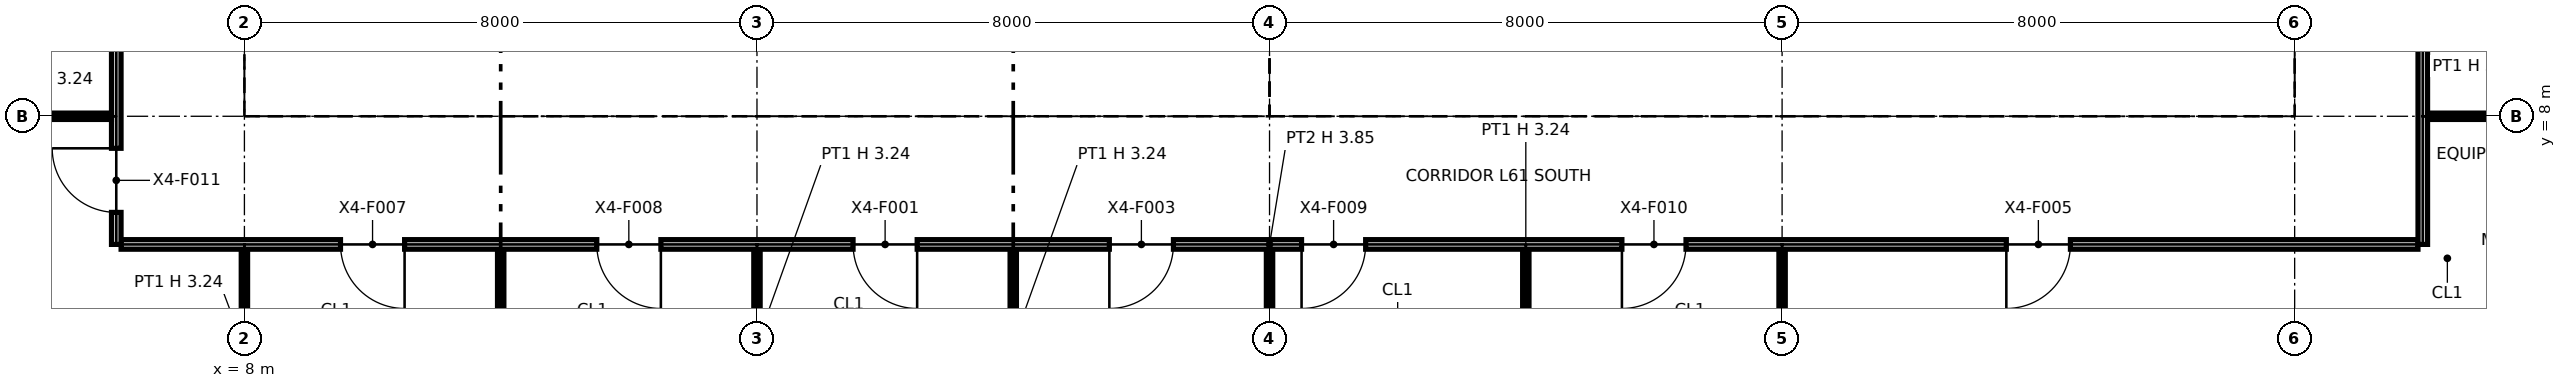
"""IFC4 building model, lengths in metres.
Left out: names, types, materials, properties, quantities, classifications, styles, units other than length and angle.
Written with IfcOpenShell. Run it as: python <this file> out.ifc"""

import sys

from ifc_helpers import new_model, si_unit, direction, frame, frame_2d, origin, origin_2d, place, context, subcontext, project, spatial, polyline, rectangle, i_section, outline, extrude, element, fill, save


model = new_model("IFC4")
c1 = context("Model", 3, precision=1e-05, world=origin(), true_north=direction((0.0, 1.0)))
c2 = subcontext(c1, "Body", "Model", "MODEL_VIEW")
j1 = project(units=[si_unit("LENGTHUNIT", "METRE"), si_unit("PLANEANGLEUNIT", "RADIAN")], contexts=[c1])
p1 = place(None, origin())
s1 = spatial("IfcSite", under=j1, at=p1, CompositionType="ELEMENT")
p2 = place(p1, origin())
s2 = spatial("IfcBuilding", under=s1, at=p2, CompositionType="ELEMENT")
p3 = place(p2, frame((0.0, 0.0, 279.0)))
s3 = spatial("IfcBuildingStorey", under=s2, at=p3, CompositionType="ELEMENT", Elevation=279.0)
for number, where, z_axis, x_axis in (
    (1, (8.0, 8.0, 0.0), (0.0, 0.0, 1.0), (1.0, 0.0, 0.0)),
    (2, (16.0, 8.0, 0.0), (0.0, 0.0, 1.0), (1.0, 0.0, 0.0)),
):
    element("IfcColumn", number, at=place(p3, frame(where, z_axis=z_axis, x_axis=x_axis)), inside=s3, PredefinedType="COLUMN", context=c2, shape_type="SweptSolid", body=[
        extrude(i_section(OverallWidth=0.257, OverallDepth=0.363, WebThickness=0.013, FlangeThickness=0.022, at=origin_2d()), origin(), (0.0, 0.0, 1.0), 3.85),
    ])
p4 = place(p3, frame((24.0, 8.0, 0.0), z_axis=(0.0, 0.0, 1.0), x_axis=(1.0, 0.0, 0.0)))
e3 = element("IfcColumn", 3, at=p4, inside=s3, PredefinedType="COLUMN", context=c2, shape_type="SweptSolid", body=[
    extrude(i_section(OverallWidth=0.371, OverallDepth=0.361, WebThickness=0.012, FlangeThickness=0.02, at=origin_2d()), origin(), (0.0, 0.0, 1.0), 3.85),
])
for number, where, z_axis, x_axis in (
    (4, (32.0, 8.0, 0.0), (0.0, 0.0, 1.0), (1.0, 0.0, 0.0)),
    (5, (40.0, 8.0, 0.0), (0.0, 0.0, 1.0), (1.0, 0.0, 0.0)),
):
    element("IfcColumn", number, at=place(p3, frame(where, z_axis=z_axis, x_axis=x_axis)), inside=s3, PredefinedType="COLUMN", context=c2, shape_type="SweptSolid", body=[
        extrude(i_section(OverallWidth=0.257, OverallDepth=0.363, WebThickness=0.013, FlangeThickness=0.022, at=origin_2d()), origin(), (0.0, 0.0, 1.0), 3.85),
    ])
p5 = place(p3, frame((8.65, 8.75, 0.0), z_axis=(0.0, 0.0, 1.0), x_axis=(1.0, 0.0, 0.0)))
e6 = element("IfcWall", 6, at=p5, inside=s3, PredefinedType="PARTITIONING", context=c2, shape_type="SweptSolid", body=[
    extrude(outline(polyline([(0.0, 0.0), (14.7, 0.0), (14.7, 3.85), (7.438, 3.85), (7.437, 3.318), (7.263, 3.318), (7.262, 3.85), (0.0, 3.85), (0.0, 0.0)])), frame((0.0, 0.1, 0.0), z_axis=(0.0, -1.0, 0.0), x_axis=(1.0, 0.0, 0.0)), (0.0, 0.0, 1.0), 0.2),
])
p6 = place(p5, frame((1.3, 0.0, 0.0)))
e7 = element("IfcOpeningElement", 7, at=p6, cuts=e6, PredefinedType="OPENING", context=c2, shape_type="SweptSolid", body=[
    extrude(rectangle(XDim=1.4, YDim=2.1, at=frame_2d((0.7, 1.05))), frame((0.0, 0.11, 0.0), z_axis=(0.0, -1.0, 0.0), x_axis=(1.0, 0.0, 0.0)), (0.0, 0.0, 1.0), 0.22),
])
p7 = place(p5, frame((4.6, 0.0, 0.0)))
e8 = element("IfcOpeningElement", 8, at=p7, cuts=e6, PredefinedType="OPENING", context=c2, shape_type="SweptSolid", body=[
    extrude(rectangle(XDim=1.4, YDim=2.1, at=frame_2d((0.7, 1.05))), frame((0.0, 0.11, 0.0), z_axis=(0.0, -1.0, 0.0), x_axis=(1.0, 0.0, 0.0)), (0.0, 0.0, 1.0), 0.22),
])
p8 = place(p5, frame((10.4, 0.0, 0.0)))
e9 = element("IfcOpeningElement", 9, at=p8, cuts=e6, PredefinedType="OPENING", context=c2, shape_type="SweptSolid", body=[
    extrude(rectangle(XDim=1.2, YDim=2.1, at=frame_2d((0.6, 1.05))), frame((0.0, 0.11, 0.0), z_axis=(0.0, -1.0, 0.0), x_axis=(1.0, 0.0, 0.0)), (0.0, 0.0, 1.0), 0.22),
])
p9 = place(p3, frame((8.75, 8.85, 0.0), z_axis=(0.0, 0.0, 1.0), x_axis=(0.0, 1.0, 0.0)))
e10 = element("IfcWall", 10, at=p9, inside=s3, PredefinedType="PARTITIONING", context=c2, shape_type="SweptSolid", body=[
    extrude(outline(polyline([(0.0, 0.0), (14.3, 0.0), (14.3, 3.85), (10.225, 3.85), (10.224, 3.44), (10.076, 3.44), (10.075, 3.85), (7.238, 3.85), (7.237, 3.318), (7.063, 3.318), (7.062, 3.85), (0.0, 3.85), (0.0, 0.0)])), frame((0.0, 0.1, 0.0), z_axis=(0.0, -1.0, 0.0), x_axis=(1.0, 0.0, 0.0)), (0.0, 0.0, 1.0), 0.2),
])
p10 = place(p9, frame((8.3, 0.0, 0.0)))
e11 = element("IfcOpeningElement", 11, at=p10, cuts=e10, PredefinedType="OPENING", context=c2, shape_type="SweptSolid", body=[
    extrude(rectangle(XDim=1.8, YDim=2.1, at=frame_2d((0.9, 1.05))), frame((0.0, 0.11, 0.0), z_axis=(0.0, -1.0, 0.0), x_axis=(1.0, 0.0, 0.0)), (0.0, 0.0, 1.0), 0.22),
])
p11 = place(p3, frame((12.4, 8.85, 0.0), z_axis=(0.0, 0.0, 1.0), x_axis=(0.0, 1.0, 0.0)))
e12 = element("IfcWall", 12, at=p11, inside=s3, PredefinedType="PARTITIONING", context=c2, shape_type="SweptSolid", body=[
    extrude(rectangle(XDim=6.85, YDim=0.2, at=frame_2d((3.425, 0.0))), origin(), (0.0, 0.0, 1.0), 3.85),
])
p12 = place(p3, frame((15.85, 8.85, 0.0), z_axis=(0.0, 0.0, 1.0), x_axis=(0.0, 1.0, 0.0)))
e13 = element("IfcWall", 13, at=p12, inside=s3, PredefinedType="PARTITIONING", context=c2, shape_type="SweptSolid", body=[
    extrude(rectangle(XDim=1.55, YDim=0.9, at=frame_2d((0.775, 0.0))), origin(), (0.0, 0.0, 1.0), 3.318),
])
p13 = place(p12, frame((0.3, 0.0, 0.0)))
e14 = element("IfcOpeningElement", 14, at=p13, cuts=e13, PredefinedType="OPENING", context=c2, shape_type="SweptSolid", body=[
    extrude(rectangle(XDim=1.1, YDim=2.1, at=frame_2d((0.55, 1.05))), frame((0.0, 0.46, 0.0), z_axis=(0.0, -1.0, 0.0), x_axis=(1.0, 0.0, 0.0)), (0.0, 0.0, 1.0), 0.92),
])
p14 = place(p3, frame((23.25, 8.85, 0.0), z_axis=(0.0, 0.0, 1.0), x_axis=(0.0, 1.0, 0.0)))
e15 = element("IfcWall", 15, at=p14, inside=s3, PredefinedType="PARTITIONING", context=c2, shape_type="SweptSolid", body=[
    extrude(outline(polyline([(0.0, 0.0), (14.3, 0.0), (14.3, 3.85), (10.225, 3.85), (10.224, 3.44), (10.076, 3.44), (10.075, 3.85), (7.238, 3.85), (7.237, 3.318), (7.063, 3.318), (7.062, 3.85), (5.225, 3.85), (5.224, 3.44), (5.076, 3.44), (5.075, 3.85), (0.0, 3.85), (0.0, 0.0)])), frame((0.0, 0.1, 0.0), z_axis=(0.0, -1.0, 0.0), x_axis=(1.0, 0.0, 0.0)), (0.0, 0.0, 1.0), 0.2),
])
p15 = place(p14, frame((8.3, 0.0, 0.0)))
e16 = element("IfcOpeningElement", 16, at=p15, cuts=e15, PredefinedType="OPENING", context=c2, shape_type="SweptSolid", body=[
    extrude(rectangle(XDim=1.8, YDim=2.1, at=frame_2d((0.9, 1.05))), frame((0.0, 0.11, 0.0), z_axis=(0.0, -1.0, 0.0), x_axis=(1.0, 0.0, 0.0)), (0.0, 0.0, 1.0), 0.22),
])
p16 = place(p3, frame((24.65, 8.75, 0.0), z_axis=(0.0, 0.0, 1.0), x_axis=(1.0, 0.0, 0.0)))
e17 = element("IfcWall", 17, at=p16, inside=s3, PredefinedType="PARTITIONING", context=c2, shape_type="SweptSolid", body=[
    extrude(outline(polyline([(0.0, 0.0), (14.7, 0.0), (14.7, 3.85), (7.438, 3.85), (7.437, 3.318), (7.263, 3.318), (7.262, 3.85), (0.0, 3.85), (0.0, 0.0)])), frame((0.0, 0.1, 0.0), z_axis=(0.0, -1.0, 0.0), x_axis=(1.0, 0.0, 0.0)), (0.0, 0.0, 1.0), 0.2),
])
p17 = place(p3, frame((24.75, 8.85, 0.0), z_axis=(0.0, 0.0, 1.0), x_axis=(0.0, 1.0, 0.0)))
e18 = element("IfcWall", 18, at=p17, inside=s3, PredefinedType="PARTITIONING", context=c2, shape_type="SweptSolid", body=[
    extrude(outline(polyline([(0.0, 0.0), (6.3, 0.0), (6.3, 3.85), (3.225, 3.85), (3.224, 3.44), (3.076, 3.44), (3.075, 3.85), (0.0, 3.85), (0.0, 0.0)])), frame((0.0, 0.1, 0.0), z_axis=(0.0, -1.0, 0.0), x_axis=(1.0, 0.0, 0.0)), (0.0, 0.0, 1.0), 0.2),
])
for number, where, z_axis, x_axis in (
    (19, (27.2, 8.85, 0.0), (0.0, 0.0, 1.0), (0.0, 1.0, 0.0)),
    (20, (29.5, 8.85, 0.0), (0.0, 0.0, 1.0), (0.0, 1.0, 0.0)),
):
    element("IfcWall", number, at=place(p3, frame(where, z_axis=z_axis, x_axis=x_axis)), inside=s3, PredefinedType="PARTITIONING", context=c2, shape_type="SweptSolid", body=[
        extrude(rectangle(XDim=2.55, YDim=0.2, at=frame_2d((1.275, 0.0))), origin(), (0.0, 0.0, 1.0), 3.85),
    ])
p18 = place(p3, frame((32.0, 8.85, 0.0), z_axis=(0.0, 0.0, 1.0), x_axis=(0.0, 1.0, 0.0)))
e21 = element("IfcWall", 21, at=p18, inside=s3, PredefinedType="PARTITIONING", context=c2, shape_type="SweptSolid", body=[
    extrude(rectangle(XDim=2.55, YDim=0.6, at=frame_2d((1.275, 0.0))), origin(), (0.0, 0.0, 1.0), 3.318),
])
for number, where, z_axis, x_axis in (
    (22, (35.6, 8.85, 0.0), (0.0, 0.0, 1.0), (0.0, 1.0, 0.0)),
    (23, (39.25, 8.85, 0.0), (0.0, 0.0, 1.0), (0.0, 1.0, 0.0)),
):
    element("IfcWall", number, at=place(p3, frame(where, z_axis=z_axis, x_axis=x_axis)), inside=s3, PredefinedType="PARTITIONING", context=c2, shape_type="SweptSolid", body=[
        extrude(rectangle(XDim=6.3, YDim=0.2, at=frame_2d((3.15, 0.0))), origin(), (0.0, 0.0, 1.0), 3.85),
    ])
for number, where, z_axis, x_axis in (
    (24, (8.0, 2.83, 0.0), (0.0, 0.0, 1.0), (0.0, 1.0, 0.0)),
    (25, (12.0, 2.83, 0.0), (0.0, 0.0, 1.0), (0.0, 1.0, 0.0)),
    (26, (24.0, 2.83, 0.0), (0.0, 0.0, 1.0), (0.0, 1.0, 0.0)),
    (27, (28.0, 2.83, 0.0), (0.0, 0.0, 1.0), (0.0, 1.0, 0.0)),
):
    element("IfcWall", number, at=place(p3, frame(where, z_axis=z_axis, x_axis=x_axis)), inside=s3, PredefinedType="PARTITIONING", context=c2, shape_type="SweptSolid", body=[
        extrude(rectangle(XDim=3.095, YDim=0.1, at=frame_2d((1.547, 0.0))), origin(), (0.0, 0.0, 1.0), 3.238),
    ])
for number, where, z_axis, x_axis in (
    (28, (16.0, 3.0, 0.0), (0.0, 0.0, 1.0), (0.0, 1.0, 0.0)),
    (29, (20.0, 3.0, 0.0), (0.0, 0.0, 1.0), (0.0, 1.0, 0.0)),
):
    element("IfcWall", number, at=place(p3, frame(where, z_axis=z_axis, x_axis=x_axis)), inside=s3, PredefinedType="PARTITIONING", context=c2, shape_type="SweptSolid", body=[
        extrude(rectangle(XDim=2.925, YDim=0.1, at=frame_2d((1.462, 0.0))), origin(), (0.0, 0.0, 1.0), 3.238),
    ])
p19 = place(p3, frame((32.0, 3.5, 0.0), z_axis=(0.0, 0.0, 1.0), x_axis=(0.0, 1.0, 0.0)))
e30 = element("IfcWall", 30, at=p19, inside=s3, PredefinedType="PARTITIONING", context=c2, shape_type="SweptSolid", body=[
    extrude(rectangle(XDim=2.425, YDim=0.1, at=frame_2d((1.212, 0.0))), origin(), (0.0, 0.0, 1.0), 3.238),
])
p20 = place(p3, frame((6.075, 6.0, 0.0), z_axis=(0.0, 0.0, 1.0), x_axis=(1.0, 0.0, 0.0)))
e31 = element("IfcWall", 31, at=p20, inside=s3, PredefinedType="PARTITIONING", context=c2, shape_type="SweptSolid", body=[
    extrude(rectangle(XDim=35.85, YDim=0.15, at=frame_2d((17.925, 0.0))), origin(), (0.0, 0.0, 1.0), 3.85),
])
p21 = place(p20, frame((12.425, 0.0, 0.0), z_axis=(0.0, 0.0, 1.0), x_axis=(-1.0, 0.0, 0.0)))
e32 = element("IfcOpeningElement", 32, at=p21, cuts=e31, PredefinedType="OPENING", context=c2, shape_type="SweptSolid", body=[
    extrude(rectangle(XDim=1.0, YDim=2.1, at=frame_2d((0.5, 1.05))), frame((0.0, 0.085, 0.0), z_axis=(0.0, -1.0, 0.0), x_axis=(1.0, 0.0, 0.0)), (0.0, 0.0, 1.0), 0.17),
])
p22 = place(p20, frame((16.425, 0.0, 0.0), z_axis=(0.0, 0.0, 1.0), x_axis=(-1.0, 0.0, 0.0)))
e33 = element("IfcOpeningElement", 33, at=p22, cuts=e31, PredefinedType="OPENING", context=c2, shape_type="SweptSolid", body=[
    extrude(rectangle(XDim=1.0, YDim=2.1, at=frame_2d((0.5, 1.05))), frame((0.0, 0.085, 0.0), z_axis=(0.0, -1.0, 0.0), x_axis=(1.0, 0.0, 0.0)), (0.0, 0.0, 1.0), 0.17),
])
p23 = place(p20, frame((30.425, 0.0, 0.0), z_axis=(0.0, 0.0, 1.0), x_axis=(-1.0, 0.0, 0.0)))
e34 = element("IfcOpeningElement", 34, at=p23, cuts=e31, PredefinedType="OPENING", context=c2, shape_type="SweptSolid", body=[
    extrude(rectangle(XDim=1.0, YDim=2.1, at=frame_2d((0.5, 1.05))), frame((0.0, 0.085, 0.0), z_axis=(0.0, -1.0, 0.0), x_axis=(1.0, 0.0, 0.0)), (0.0, 0.0, 1.0), 0.17),
])
p24 = place(p20, frame((4.425, 0.0, 0.0), z_axis=(0.0, 0.0, 1.0), x_axis=(-1.0, 0.0, 0.0)))
e35 = element("IfcOpeningElement", 35, at=p24, cuts=e31, PredefinedType="OPENING", context=c2, shape_type="SweptSolid", body=[
    extrude(rectangle(XDim=1.0, YDim=2.1, at=frame_2d((0.5, 1.05))), frame((0.0, 0.085, 0.0), z_axis=(0.0, -1.0, 0.0), x_axis=(1.0, 0.0, 0.0)), (0.0, 0.0, 1.0), 0.17),
])
p25 = place(p20, frame((8.425, 0.0, 0.0), z_axis=(0.0, 0.0, 1.0), x_axis=(-1.0, 0.0, 0.0)))
e36 = element("IfcOpeningElement", 36, at=p25, cuts=e31, PredefinedType="OPENING", context=c2, shape_type="SweptSolid", body=[
    extrude(rectangle(XDim=1.0, YDim=2.1, at=frame_2d((0.5, 1.05))), frame((0.0, 0.085, 0.0), z_axis=(0.0, -1.0, 0.0), x_axis=(1.0, 0.0, 0.0)), (0.0, 0.0, 1.0), 0.17),
])
p26 = place(p20, frame((19.425, 0.0, 0.0), z_axis=(0.0, 0.0, 1.0), x_axis=(-1.0, 0.0, 0.0)))
e37 = element("IfcOpeningElement", 37, at=p26, cuts=e31, PredefinedType="OPENING", context=c2, shape_type="SweptSolid", body=[
    extrude(rectangle(XDim=1.0, YDim=2.1, at=frame_2d((0.5, 1.05))), frame((0.0, 0.085, 0.0), z_axis=(0.0, -1.0, 0.0), x_axis=(1.0, 0.0, 0.0)), (0.0, 0.0, 1.0), 0.17),
])
p27 = place(p20, frame((24.425, 0.0, 0.0), z_axis=(0.0, 0.0, 1.0), x_axis=(-1.0, 0.0, 0.0)))
e38 = element("IfcOpeningElement", 38, at=p27, cuts=e31, PredefinedType="OPENING", context=c2, shape_type="SweptSolid", body=[
    extrude(rectangle(XDim=1.0, YDim=2.1, at=frame_2d((0.5, 1.05))), frame((0.0, 0.085, 0.0), z_axis=(0.0, -1.0, 0.0), x_axis=(1.0, 0.0, 0.0)), (0.0, 0.0, 1.0), 0.17),
])
p28 = place(p3, frame((6.0, 6.0, 0.0), z_axis=(0.0, 0.0, 1.0), x_axis=(0.0, 1.0, 0.0)))
e39 = element("IfcWall", 39, at=p28, inside=s3, PredefinedType="PARTITIONING", context=c2, shape_type="SweptSolid", body=[
    extrude(outline(polyline([(0.0, 0.0), (13.375, 0.0), (13.375, 3.85), (10.3, 3.85), (10.298, 3.238), (9.702, 3.238), (9.7, 3.85), (6.3, 3.85), (6.298, 3.238), (5.702, 3.238), (5.7, 3.85), (2.3, 3.85), (2.298, 3.238), (1.702, 3.238), (1.7, 3.85), (0.0, 3.85), (0.0, 0.0)])), frame((0.0, 0.075, 0.0), z_axis=(0.0, -1.0, 0.0), x_axis=(1.0, 0.0, 0.0)), (0.0, 0.0, 1.0), 0.15),
])
p29 = place(p28, frame((0.5, 0.0, 0.0)))
e40 = element("IfcOpeningElement", 40, at=p29, cuts=e39, PredefinedType="OPENING", context=c2, shape_type="SweptSolid", body=[
    extrude(rectangle(XDim=1.0, YDim=2.1, at=frame_2d((0.5, 1.05))), frame((0.0, 0.085, 0.0), z_axis=(0.0, -1.0, 0.0), x_axis=(1.0, 0.0, 0.0)), (0.0, 0.0, 1.0), 0.17),
])
p30 = place(p28, frame((3.5, 0.0, 0.0)))
e41 = element("IfcOpeningElement", 41, at=p30, cuts=e39, PredefinedType="OPENING", context=c2, shape_type="SweptSolid", body=[
    extrude(rectangle(XDim=1.0, YDim=2.1, at=frame_2d((0.5, 1.05))), frame((0.0, 0.085, 0.0), z_axis=(0.0, -1.0, 0.0), x_axis=(1.0, 0.0, 0.0)), (0.0, 0.0, 1.0), 0.17),
])
p31 = place(p28, frame((7.5, 0.0, 0.0)))
e42 = element("IfcOpeningElement", 42, at=p31, cuts=e39, PredefinedType="OPENING", context=c2, shape_type="SweptSolid", body=[
    extrude(rectangle(XDim=1.0, YDim=2.1, at=frame_2d((0.5, 1.05))), frame((0.0, 0.085, 0.0), z_axis=(0.0, -1.0, 0.0), x_axis=(1.0, 0.0, 0.0)), (0.0, 0.0, 1.0), 0.17),
])
p32 = place(p28, frame((11.225, 0.0, 0.0)))
e43 = element("IfcOpeningElement", 43, at=p32, cuts=e39, PredefinedType="OPENING", context=c2, shape_type="SweptSolid", body=[
    extrude(rectangle(XDim=1.0, YDim=2.1, at=frame_2d((0.5, 1.05))), frame((0.0, 0.085, 0.0), z_axis=(0.0, -1.0, 0.0), x_axis=(1.0, 0.0, 0.0)), (0.0, 0.0, 1.0), 0.17),
])
p33 = place(p3, frame((42.0, 6.0, 0.0), z_axis=(0.0, 0.0, 1.0), x_axis=(0.0, 1.0, 0.0)))
e44 = element("IfcWall", 44, at=p33, inside=s3, PredefinedType="PARTITIONING", context=c2, shape_type="SweptSolid", body=[
    extrude(outline(polyline([(0.0, 0.0), (11.925, 0.0), (11.925, 3.85), (10.3, 3.85), (10.298, 3.238), (9.702, 3.238), (9.7, 3.85), (6.3, 3.85), (6.298, 3.238), (5.702, 3.238), (5.7, 3.85), (2.3, 3.85), (2.298, 3.238), (1.702, 3.238), (1.7, 3.85), (0.0, 3.85), (0.0, 0.0)])), frame((0.0, 0.075, 0.0), z_axis=(0.0, -1.0, 0.0), x_axis=(1.0, 0.0, 0.0)), (0.0, 0.0, 1.0), 0.15),
])
p34 = place(p33, frame((4.5, 0.0, 0.0), z_axis=(0.0, 0.0, 1.0), x_axis=(-1.0, 0.0, 0.0)))
e45 = element("IfcOpeningElement", 45, at=p34, cuts=e44, PredefinedType="OPENING", context=c2, shape_type="SweptSolid", body=[
    extrude(rectangle(XDim=1.0, YDim=2.1, at=frame_2d((0.5, 1.05))), frame((0.0, 0.085, 0.0), z_axis=(0.0, -1.0, 0.0), x_axis=(1.0, 0.0, 0.0)), (0.0, 0.0, 1.0), 0.17),
])
p35 = place(p33, frame((8.5, 0.0, 0.0), z_axis=(0.0, 0.0, 1.0), x_axis=(-1.0, 0.0, 0.0)))
e46 = element("IfcOpeningElement", 46, at=p35, cuts=e44, PredefinedType="OPENING", context=c2, shape_type="SweptSolid", body=[
    extrude(rectangle(XDim=1.0, YDim=2.1, at=frame_2d((0.5, 1.05))), frame((0.0, 0.085, 0.0), z_axis=(0.0, -1.0, 0.0), x_axis=(1.0, 0.0, 0.0)), (0.0, 0.0, 1.0), 0.17),
])
p36 = place(p33, frame((11.5, 0.0, 0.0), z_axis=(0.0, 0.0, 1.0), x_axis=(-1.0, 0.0, 0.0)))
e47 = element("IfcOpeningElement", 47, at=p36, cuts=e44, PredefinedType="OPENING", context=c2, shape_type="SweptSolid", body=[
    extrude(rectangle(XDim=1.0, YDim=2.1, at=frame_2d((0.5, 1.05))), frame((0.0, 0.085, 0.0), z_axis=(0.0, -1.0, 0.0), x_axis=(1.0, 0.0, 0.0)), (0.0, 0.0, 1.0), 0.17),
])
for number, where, z_axis, x_axis in (
    (48, (2.83, 8.0, 0.0), (0.0, 0.0, 1.0), (1.0, 0.0, 0.0)),
    (49, (42.075, 8.0, 0.0), (0.0, 0.0, 1.0), (1.0, 0.0, 0.0)),
):
    element("IfcWall", number, at=place(p3, frame(where, z_axis=z_axis, x_axis=x_axis)), inside=s3, PredefinedType="PARTITIONING", context=c2, shape_type="SweptSolid", body=[
        extrude(rectangle(XDim=3.095, YDim=0.1, at=frame_2d((1.547, 0.0))), origin(), (0.0, 0.0, 1.0), 3.238),
    ])
p37 = place(p6, origin())
e50 = element("IfcDoor", 50, at=p37, inside=s3, OperationType="DOUBLE_DOOR_SINGLE_SWING", PredefinedType="NOTDEFINED", context=c2, shape_type="SweptSolid", body=[
    extrude(rectangle(XDim=1.4, YDim=2.1, at=frame_2d((0.7, 1.05))), frame((0.0, 0.025, 0.0), z_axis=(0.0, -1.0, 0.0), x_axis=(1.0, 0.0, 0.0)), (0.0, 0.0, 1.0), 0.05),
])
fill(e7, e50)
p38 = place(p7, origin())
e51 = element("IfcDoor", 51, at=p38, inside=s3, OperationType="DOUBLE_DOOR_SINGLE_SWING", PredefinedType="NOTDEFINED", context=c2, shape_type="SweptSolid", body=[
    extrude(rectangle(XDim=1.4, YDim=2.1, at=frame_2d((0.7, 1.05))), frame((0.0, 0.025, 0.0), z_axis=(0.0, -1.0, 0.0), x_axis=(1.0, 0.0, 0.0)), (0.0, 0.0, 1.0), 0.05),
])
fill(e8, e51)
p39 = place(p8, origin())
e52 = element("IfcDoor", 52, at=p39, inside=s3, OperationType="SINGLE_SWING_LEFT", PredefinedType="NOTDEFINED", context=c2, shape_type="SweptSolid", body=[
    extrude(rectangle(XDim=1.2, YDim=2.1, at=frame_2d((0.6, 1.05))), frame((0.0, 0.025, 0.0), z_axis=(0.0, -1.0, 0.0), x_axis=(1.0, 0.0, 0.0)), (0.0, 0.0, 1.0), 0.05),
])
fill(e9, e52)
p40 = place(p21, origin())
e53 = element("IfcDoor", 53, at=p40, inside=s3, OperationType="SINGLE_SWING_LEFT", PredefinedType="DOOR", context=c2, shape_type="SweptSolid", body=[
    extrude(rectangle(XDim=1.0, YDim=2.1, at=frame_2d((0.5, 1.05))), frame((0.0, 0.025, 0.0), z_axis=(0.0, -1.0, 0.0), x_axis=(1.0, 0.0, 0.0)), (0.0, 0.0, 1.0), 0.05),
])
fill(e32, e53)
p41 = place(p22, origin())
e54 = element("IfcDoor", 54, at=p41, inside=s3, OperationType="SINGLE_SWING_RIGHT", PredefinedType="DOOR", context=c2, shape_type="SweptSolid", body=[
    extrude(rectangle(XDim=1.0, YDim=2.1, at=frame_2d((0.5, 1.05))), frame((0.0, 0.025, 0.0), z_axis=(0.0, -1.0, 0.0), x_axis=(1.0, 0.0, 0.0)), (0.0, 0.0, 1.0), 0.05),
])
fill(e33, e54)
p42 = place(p23, origin())
e55 = element("IfcDoor", 55, at=p42, inside=s3, OperationType="SINGLE_SWING_RIGHT", PredefinedType="DOOR", context=c2, shape_type="SweptSolid", body=[
    extrude(rectangle(XDim=1.0, YDim=2.1, at=frame_2d((0.5, 1.05))), frame((0.0, 0.025, 0.0), z_axis=(0.0, -1.0, 0.0), x_axis=(1.0, 0.0, 0.0)), (0.0, 0.0, 1.0), 0.05),
])
fill(e34, e55)
p43 = place(p24, origin())
e56 = element("IfcDoor", 56, at=p43, inside=s3, OperationType="SINGLE_SWING_LEFT", PredefinedType="DOOR", context=c2, shape_type="SweptSolid", body=[
    extrude(rectangle(XDim=1.0, YDim=2.1, at=frame_2d((0.5, 1.05))), frame((0.0, 0.025, 0.0), z_axis=(0.0, -1.0, 0.0), x_axis=(1.0, 0.0, 0.0)), (0.0, 0.0, 1.0), 0.05),
])
fill(e35, e56)
p44 = place(p25, origin())
e57 = element("IfcDoor", 57, at=p44, inside=s3, OperationType="SINGLE_SWING_LEFT", PredefinedType="DOOR", context=c2, shape_type="SweptSolid", body=[
    extrude(rectangle(XDim=1.0, YDim=2.1, at=frame_2d((0.5, 1.05))), frame((0.0, 0.025, 0.0), z_axis=(0.0, -1.0, 0.0), x_axis=(1.0, 0.0, 0.0)), (0.0, 0.0, 1.0), 0.05),
])
fill(e36, e57)
p45 = place(p26, origin())
e58 = element("IfcDoor", 58, at=p45, inside=s3, OperationType="SINGLE_SWING_RIGHT", PredefinedType="DOOR", context=c2, shape_type="SweptSolid", body=[
    extrude(rectangle(XDim=1.0, YDim=2.1, at=frame_2d((0.5, 1.05))), frame((0.0, 0.025, 0.0), z_axis=(0.0, -1.0, 0.0), x_axis=(1.0, 0.0, 0.0)), (0.0, 0.0, 1.0), 0.05),
])
fill(e37, e58)
p46 = place(p27, origin())
e59 = element("IfcDoor", 59, at=p46, inside=s3, OperationType="SINGLE_SWING_RIGHT", PredefinedType="DOOR", context=c2, shape_type="SweptSolid", body=[
    extrude(rectangle(XDim=1.0, YDim=2.1, at=frame_2d((0.5, 1.05))), frame((0.0, 0.025, 0.0), z_axis=(0.0, -1.0, 0.0), x_axis=(1.0, 0.0, 0.0)), (0.0, 0.0, 1.0), 0.05),
])
fill(e38, e59)
p47 = place(p29, origin())
e60 = element("IfcDoor", 60, at=p47, inside=s3, OperationType="SINGLE_SWING_RIGHT", PredefinedType="DOOR", context=c2, shape_type="SweptSolid", body=[
    extrude(rectangle(XDim=1.0, YDim=2.1, at=frame_2d((0.5, 1.05))), frame((0.0, 0.025, 0.0), z_axis=(0.0, -1.0, 0.0), x_axis=(1.0, 0.0, 0.0)), (0.0, 0.0, 1.0), 0.05),
])
fill(e40, e60)
save(model, sys.argv[1])
